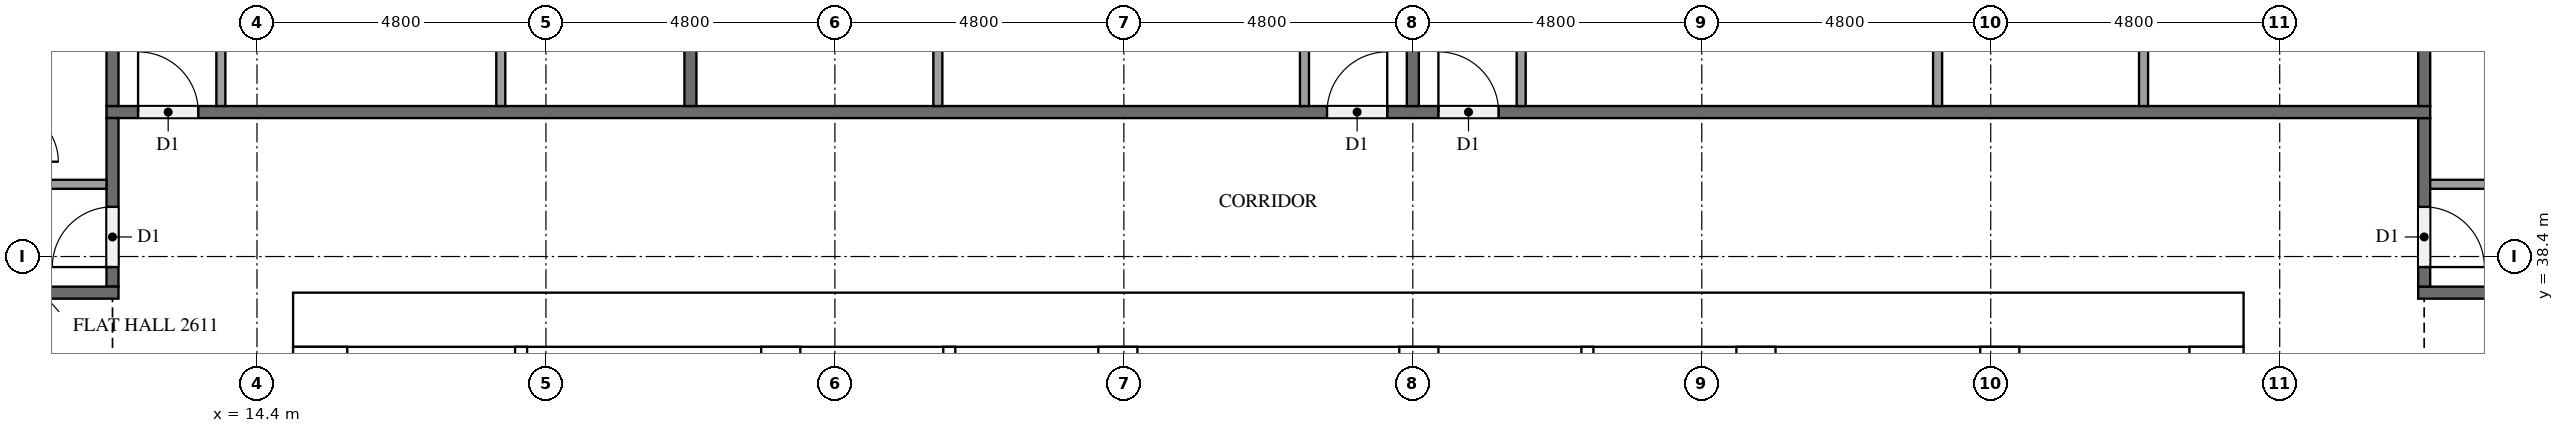
"""IFC4 building model, lengths in metres.
Left out: names, types, materials, properties, quantities, classifications, styles, units other than length and angle.
Written with IfcOpenShell. Run it as: python <this file> out.ifc"""

import sys

from ifc_helpers import new_model, si_unit, direction, frame, frame_2d, origin, place, context, subcontext, project, spatial, rectangle, extrude, element, fill, save


model = new_model("IFC4")
c1 = context("Model", 3, precision=1e-05, world=origin(), true_north=direction((0.0, 1.0)))
c2 = subcontext(c1, "Body", "Model", "MODEL_VIEW")
j1 = project(units=[si_unit("LENGTHUNIT", "METRE"), si_unit("PLANEANGLEUNIT", "RADIAN")], contexts=[c1])
p1 = place(None, origin())
s1 = spatial("IfcSite", under=j1, at=p1, CompositionType="ELEMENT")
p2 = place(p1, origin())
s2 = spatial("IfcBuilding", under=s1, at=p2, CompositionType="ELEMENT")
p3 = place(p2, frame((0.0, 0.0, 103.2)))
s3 = spatial("IfcBuildingStorey", under=s2, at=p3, CompositionType="ELEMENT", Elevation=103.2)
p4 = place(p3, frame((15.0, 37.35, 0.0), z_axis=(0.0, 0.0, 1.0), x_axis=(1.0, 0.0, 0.0)))
e1 = element("IfcWall", 1, at=p4, inside=s3, PredefinedType="SHEAR", context=c2, shape_type="SweptSolid", body=[
    extrude(rectangle(XDim=32.4, YDim=0.9, at=frame_2d((16.2, 0.0))), origin(), (0.0, 0.0, 1.0), 3.2),
])
p5 = place(p4, frame((15.3, 0.0, 0.0)))
e2 = element("IfcOpeningElement", 2, at=p5, cuts=e1, PredefinedType="OPENING", context=c2, shape_type="SweptSolid", body=[
    extrude(rectangle(XDim=1.8, YDim=2.1, at=frame_2d((0.9, 1.05))), frame((0.0, 0.46, 0.0), z_axis=(0.0, -1.0, 0.0), x_axis=(1.0, 0.0, 0.0)), (0.0, 0.0, 1.0), 0.92),
])
p6 = place(p4, frame((1.794, 0.0, 0.0)))
e3 = element("IfcOpeningElement", 3, at=p6, cuts=e1, PredefinedType="OPENING", context=c2, shape_type="SweptSolid", body=[
    extrude(rectangle(XDim=1.0, YDim=2.1, at=frame_2d((0.5, 1.05))), frame((0.0, 0.46, 0.0), z_axis=(0.0, -1.0, 0.0), x_axis=(1.0, 0.0, 0.0)), (0.0, 0.0, 1.0), 0.92),
])
p7 = place(p4, frame((5.331, 0.0, 0.0)))
e4 = element("IfcOpeningElement", 4, at=p7, cuts=e1, PredefinedType="OPENING", context=c2, shape_type="SweptSolid", body=[
    extrude(rectangle(XDim=1.0, YDim=2.1, at=frame_2d((0.5, 1.05))), frame((0.0, 0.46, 0.0), z_axis=(0.0, -1.0, 0.0), x_axis=(1.0, 0.0, 0.0)), (0.0, 0.0, 1.0), 0.92),
])
p8 = place(p3, frame((15.45, 15.9, 0.0), z_axis=(0.0, 0.0, 1.0), x_axis=(0.0, 1.0, 0.0)))
e5 = element("IfcWall", 5, at=p8, inside=s3, PredefinedType="SHEAR", context=c2, shape_type="SweptSolid", body=[
    extrude(rectangle(XDim=21.0, YDim=0.9, at=frame_2d((10.5, 0.0))), origin(), (0.0, 0.0, 1.0), 3.2),
])
p9 = place(p8, frame((4.86, 0.0, 0.0)))
e6 = element("IfcOpeningElement", 6, at=p9, cuts=e5, PredefinedType="OPENING", context=c2, shape_type="SweptSolid", body=[
    extrude(rectangle(XDim=1.2, YDim=2.1, at=frame_2d((0.6, 1.05))), frame((0.0, 0.46, 0.0), z_axis=(0.0, -1.0, 0.0), x_axis=(1.0, 0.0, 0.0)), (0.0, 0.0, 1.0), 0.92),
])
p10 = place(p3, frame((46.95, 15.9, 0.0), z_axis=(0.0, 0.0, 1.0), x_axis=(0.0, 1.0, 0.0)))
e7 = element("IfcWall", 7, at=p10, inside=s3, PredefinedType="SHEAR", context=c2, shape_type="SweptSolid", body=[
    extrude(rectangle(XDim=21.0, YDim=0.9, at=frame_2d((10.5, 0.0))), origin(), (0.0, 0.0, 1.0), 3.2),
])
p11 = place(p10, frame((10.2, 0.0, 0.0)))
e8 = element("IfcOpeningElement", 8, at=p11, cuts=e7, PredefinedType="OPENING", context=c2, shape_type="SweptSolid", body=[
    extrude(rectangle(XDim=1.2, YDim=2.1, at=frame_2d((0.6, 1.05))), frame((0.0, 0.46, 0.0), z_axis=(0.0, -1.0, 0.0), x_axis=(1.0, 0.0, 0.0)), (0.0, 0.0, 1.0), 0.92),
])
p12 = place(p3, frame((23.1, 15.9, 0.0), z_axis=(0.0, 0.0, 1.0), x_axis=(0.0, 1.0, 0.0)))
e9 = element("IfcWall", 9, at=p12, inside=s3, PredefinedType="SHEAR", context=c2, shape_type="SweptSolid", body=[
    extrude(rectangle(XDim=21.0, YDim=0.65, at=frame_2d((10.5, 0.0))), origin(), (0.0, 0.0, 1.0), 3.2),
])
p13 = place(p3, frame((39.3, 27.75, 0.0), z_axis=(0.0, 0.0, 1.0), x_axis=(0.0, 1.0, 0.0)))
e10 = element("IfcWall", 10, at=p13, inside=s3, PredefinedType="SHEAR", context=c2, shape_type="SweptSolid", body=[
    extrude(rectangle(XDim=9.15, YDim=0.65, at=frame_2d((4.575, 0.0))), origin(), (0.0, 0.0, 1.0), 3.2),
])
p14 = place(p3, frame((43.35, 27.75, 0.0), z_axis=(0.0, 0.0, 1.0), x_axis=(0.0, 1.0, 0.0)))
e11 = element("IfcWall", 11, at=p14, inside=s3, PredefinedType="SHEAR", context=c2, shape_type="SweptSolid", body=[
    extrude(rectangle(XDim=9.15, YDim=0.65, at=frame_2d((4.575, 0.0))), origin(), (0.0, 0.0, 1.0), 3.2),
])
p15 = place(p14, frame((7.65, 0.0, 0.0)))
e12 = element("IfcOpeningElement", 12, at=p15, cuts=e11, PredefinedType="OPENING", context=c2, shape_type="SweptSolid", body=[
    extrude(rectangle(XDim=1.2, YDim=2.1, at=frame_2d((0.6, 1.05))), frame((0.0, 0.335, 0.0), z_axis=(0.0, -1.0, 0.0), x_axis=(1.0, 0.0, 0.0)), (0.0, 0.0, 1.0), 0.67),
])
for number, where, z_axis, x_axis in (
    (13, (28.7, 33.875, 0.0), (0.0, 0.0, 1.0), (0.0, 1.0, 0.0)),
    (14, (33.7, 33.875, 0.0), (0.0, 0.0, 1.0), (0.0, 1.0, 0.0)),
):
    element("IfcWall", number, at=place(p3, frame(where, z_axis=z_axis, x_axis=x_axis)), inside=s3, PredefinedType="SHEAR", context=c2, shape_type="SweptSolid", body=[
        extrude(rectangle(XDim=3.025, YDim=0.65, at=frame_2d((1.512, 0.0))), origin(), (0.0, 0.0, 1.0), 3.2),
    ])
for number, where, z_axis, x_axis in (
    (15, (25.9, 33.875, 0.0), (0.0, 0.0, 1.0), (0.0, 1.0, 0.0)),
    (16, (36.5, 33.875, 0.0), (0.0, 0.0, 1.0), (0.0, 1.0, 0.0)),
):
    element("IfcWall", number, at=place(p3, frame(where, z_axis=z_axis, x_axis=x_axis)), inside=s3, PredefinedType="SOLIDWALL", context=c2, shape_type="SweptSolid", body=[
        extrude(rectangle(XDim=3.025, YDim=0.2, at=frame_2d((1.512, 0.0))), origin(), (0.0, 0.0, 1.0), 3.2),
    ])
p16 = place(p3, frame((18.788, 31.575, 0.0), z_axis=(0.0, 0.0, 1.0), x_axis=(0.0, 1.0, 0.0)))
e17 = element("IfcWall", 17, at=p16, inside=s3, PredefinedType="PARTITIONING", context=c2, shape_type="SweptSolid", body=[
    extrude(rectangle(XDim=5.325, YDim=0.2, at=frame_2d((2.663, 0.0))), origin(), (0.0, 0.0, 1.0), 3.2),
])
p17 = place(p3, frame((52.5, 37.8, 0.0), z_axis=(0.0, 0.0, 1.0), x_axis=(-1.0, 0.0, 0.0)))
e18 = element("IfcWall", 18, at=p17, inside=s3, PredefinedType="PARTITIONING", context=c2, shape_type="SweptSolid", body=[
    extrude(rectangle(XDim=2.2, YDim=0.2, at=frame_2d((1.1, 0.0))), origin(), (0.0, 0.0, 1.0), 3.2),
])
p18 = place(p3, frame((50.4, 40.7, 0.0), z_axis=(0.0, 0.0, 1.0), x_axis=(0.0, -1.0, 0.0)))
e19 = element("IfcWall", 19, at=p18, inside=s3, PredefinedType="PARTITIONING", context=c2, shape_type="SweptSolid", body=[
    extrude(rectangle(XDim=2.8, YDim=0.2, at=frame_2d((1.4, 0.0))), origin(), (0.0, 0.0, 1.0), 3.2),
])
p19 = place(p18, frame((1.475, 0.0, 0.0)))
e20 = element("IfcOpeningElement", 20, at=p19, cuts=e19, PredefinedType="OPENING", context=c2, shape_type="SweptSolid", body=[
    extrude(rectangle(XDim=1.0, YDim=2.1, at=frame_2d((0.5, 1.05))), frame((0.0, 0.11, 0.0), z_axis=(0.0, -1.0, 0.0), x_axis=(1.0, 0.0, 0.0)), (0.0, 0.0, 1.0), 0.22),
])
p20 = place(p3, frame((11.9, 40.8, 0.0), z_axis=(0.0, 0.0, 1.0), x_axis=(1.0, 0.0, 0.0)))
e21 = element("IfcWall", 21, at=p20, inside=s3, PredefinedType="PARTITIONING", context=c2, shape_type="SweptSolid", body=[
    extrude(rectangle(XDim=38.6, YDim=0.2, at=frame_2d((19.3, 0.0))), origin(), (0.0, 0.0, 1.0), 3.2),
])
p21 = place(p20, frame((22.125, 0.0, 0.0)))
e22 = element("IfcOpeningElement", 22, at=p21, cuts=e21, PredefinedType="OPENING", context=c2, shape_type="SweptSolid", body=[
    extrude(rectangle(XDim=1.0, YDim=2.1, at=frame_2d((0.5, 1.05))), frame((0.0, 0.11, 0.0), z_axis=(0.0, -1.0, 0.0), x_axis=(1.0, 0.0, 0.0)), (0.0, 0.0, 1.0), 0.22),
])
p22 = place(p20, frame((20.275, 0.0, 0.0)))
e23 = element("IfcOpeningElement", 23, at=p22, cuts=e21, PredefinedType="OPENING", context=c2, shape_type="SweptSolid", body=[
    extrude(rectangle(XDim=1.0, YDim=2.1, at=frame_2d((0.5, 1.05))), frame((0.0, 0.11, 0.0), z_axis=(0.0, -1.0, 0.0), x_axis=(1.0, 0.0, 0.0)), (0.0, 0.0, 1.0), 0.22),
])
p23 = place(p20, frame((0.525, 0.0, 0.0)))
e24 = element("IfcOpeningElement", 24, at=p23, cuts=e21, PredefinedType="OPENING", context=c2, shape_type="SweptSolid", body=[
    extrude(rectangle(XDim=1.0, YDim=2.1, at=frame_2d((0.5, 1.05))), frame((0.0, 0.11, 0.0), z_axis=(0.0, -1.0, 0.0), x_axis=(1.0, 0.0, 0.0)), (0.0, 0.0, 1.0), 0.22),
])
p24 = place(p3, frame((12.0, 37.9, 0.0), z_axis=(0.0, 0.0, 1.0), x_axis=(0.0, 1.0, 0.0)))
e25 = element("IfcWall", 25, at=p24, inside=s3, PredefinedType="PARTITIONING", context=c2, shape_type="SweptSolid", body=[
    extrude(rectangle(XDim=2.8, YDim=0.2, at=frame_2d((1.4, 0.0))), origin(), (0.0, 0.0, 1.0), 3.2),
])
p25 = place(p24, frame((0.325, 0.0, 0.0)))
e26 = element("IfcOpeningElement", 26, at=p25, cuts=e25, PredefinedType="OPENING", context=c2, shape_type="SweptSolid", body=[
    extrude(rectangle(XDim=1.0, YDim=2.1, at=frame_2d((0.5, 1.05))), frame((0.0, 0.11, 0.0), z_axis=(0.0, -1.0, 0.0), x_axis=(1.0, 0.0, 0.0)), (0.0, 0.0, 1.0), 0.22),
])
p26 = place(p3, frame((12.1, 37.8, 0.0), z_axis=(0.0, 0.0, 1.0), x_axis=(-1.0, 0.0, 0.0)))
e27 = element("IfcWall", 27, at=p26, inside=s3, PredefinedType="PARTITIONING", context=c2, shape_type="SweptSolid", body=[
    extrude(rectangle(XDim=2.2, YDim=0.2, at=frame_2d((1.1, 0.0))), origin(), (0.0, 0.0, 1.0), 3.2),
])
for number, where, z_axis, x_axis in (
    (28, (50.4, 40.9, 0.0), (0.0, 0.0, 1.0), (0.0, 1.0, 0.0)),
    (29, (33.6, 52.7, 0.0), (0.0, 0.0, 1.0), (0.0, -1.0, 0.0)),
    (30, (21.6, 52.7, 0.0), (0.0, 0.0, 1.0), (0.0, -1.0, 0.0)),
    (31, (12.0, 52.7, 0.0), (0.0, 0.0, 1.0), (0.0, -1.0, 0.0)),
):
    element("IfcWall", number, at=place(p3, frame(where, z_axis=z_axis, x_axis=x_axis)), inside=s3, PredefinedType="PARTITIONING", context=c2, shape_type="SweptSolid", body=[
        extrude(rectangle(XDim=11.8, YDim=0.2, at=frame_2d((5.9, 0.0))), origin(), (0.0, 0.0, 1.0), 3.2),
    ])
p27 = place(p3, frame((50.5, 39.6, 0.0), z_axis=(0.0, 0.0, 1.0), x_axis=(1.0, 0.0, 0.0)))
e32 = element("IfcWall", 32, at=p27, inside=s3, PredefinedType="PARTITIONING", context=c2, shape_type="SweptSolid", body=[
    extrude(rectangle(XDim=4.625, YDim=0.15, at=frame_2d((2.312, 0.0))), origin(), (0.0, 0.0, 1.0), 3.2),
])
for number, where, z_axis, x_axis in (
    (33, (42.317, 40.9, 0.0), (0.0, 0.0, 1.0), (0.0, 1.0, 0.0)),
    (34, (45.739, 40.9, 0.0), (0.0, 0.0, 1.0), (0.0, 1.0, 0.0)),
):
    element("IfcWall", number, at=place(p3, frame(where, z_axis=z_axis, x_axis=x_axis)), inside=s3, PredefinedType="PARTITIONING", context=c2, shape_type="SweptSolid", body=[
        extrude(rectangle(XDim=3.875, YDim=0.15, at=frame_2d((1.938, 0.0))), origin(), (0.0, 0.0, 1.0), 3.2),
    ])
p28 = place(p3, frame((35.4, 40.9, 0.0), z_axis=(0.0, 0.0, 1.0), x_axis=(0.0, 1.0, 0.0)))
e35 = element("IfcWall", 35, at=p28, inside=s3, PredefinedType="PARTITIONING", context=c2, shape_type="SweptSolid", body=[
    extrude(rectangle(XDim=4.025, YDim=0.15, at=frame_2d((2.013, 0.0))), origin(), (0.0, 0.0, 1.0), 3.2),
])
p29 = place(p3, frame((25.71, 40.9, 0.0), z_axis=(0.0, 0.0, 1.0), x_axis=(0.0, 1.0, 0.0)))
e36 = element("IfcWall", 36, at=p29, inside=s3, PredefinedType="PARTITIONING", context=c2, shape_type="SweptSolid", body=[
    extrude(rectangle(XDim=3.125, YDim=0.15, at=frame_2d((1.562, 0.0))), origin(), (0.0, 0.0, 1.0), 3.2),
])
p30 = place(p3, frame((31.8, 40.9, 0.0), z_axis=(0.0, 0.0, 1.0), x_axis=(0.0, 1.0, 0.0)))
e37 = element("IfcWall", 37, at=p30, inside=s3, PredefinedType="PARTITIONING", context=c2, shape_type="SweptSolid", body=[
    extrude(rectangle(XDim=3.275, YDim=0.15, at=frame_2d((1.638, 0.0))), origin(), (0.0, 0.0, 1.0), 3.2),
])
p31 = place(p3, frame((18.45, 40.9, 0.0), z_axis=(0.0, 0.0, 1.0), x_axis=(0.0, 1.0, 0.0)))
e38 = element("IfcWall", 38, at=p31, inside=s3, PredefinedType="PARTITIONING", context=c2, shape_type="SweptSolid", body=[
    extrude(rectangle(XDim=3.875, YDim=0.15, at=frame_2d((1.938, 0.0))), origin(), (0.0, 0.0, 1.0), 3.2),
])
p32 = place(p3, frame((13.8, 40.9, 0.0), z_axis=(0.0, 0.0, 1.0), x_axis=(0.0, 1.0, 0.0)))
e39 = element("IfcWall", 39, at=p32, inside=s3, PredefinedType="PARTITIONING", context=c2, shape_type="SweptSolid", body=[
    extrude(rectangle(XDim=4.025, YDim=0.15, at=frame_2d((2.013, 0.0))), origin(), (0.0, 0.0, 1.0), 3.2),
])
p33 = place(p3, frame((11.9, 39.6, 0.0), z_axis=(0.0, 0.0, 1.0), x_axis=(-1.0, 0.0, 0.0)))
e40 = element("IfcWall", 40, at=p33, inside=s3, PredefinedType="PARTITIONING", context=c2, shape_type="SweptSolid", body=[
    extrude(rectangle(XDim=1.775, YDim=0.15, at=frame_2d((0.887, 0.0))), origin(), (0.0, 0.0, 1.0), 3.2),
])
p34 = place(p5, origin())
e41 = element("IfcDoor", 41, at=p34, inside=s3, OperationType="DOUBLE_DOOR_SINGLE_SWING", PredefinedType="DOOR", context=c2, shape_type="SweptSolid", body=[
    extrude(rectangle(XDim=1.8, YDim=2.1, at=frame_2d((0.9, 1.05))), frame((0.0, 0.025, 0.0), z_axis=(0.0, -1.0, 0.0), x_axis=(1.0, 0.0, 0.0)), (0.0, 0.0, 1.0), 0.05),
])
fill(e2, e41)
p35 = place(p6, origin())
e42 = element("IfcDoor", 42, at=p35, inside=s3, OperationType="SINGLE_SWING_LEFT", PredefinedType="DOOR", context=c2, shape_type="SweptSolid", body=[
    extrude(rectangle(XDim=1.0, YDim=2.1, at=frame_2d((0.5, 1.05))), frame((0.0, 0.025, 0.0), z_axis=(0.0, -1.0, 0.0), x_axis=(1.0, 0.0, 0.0)), (0.0, 0.0, 1.0), 0.05),
])
fill(e3, e42)
p36 = place(p7, origin())
e43 = element("IfcDoor", 43, at=p36, inside=s3, OperationType="SINGLE_SWING_RIGHT", PredefinedType="DOOR", context=c2, shape_type="SweptSolid", body=[
    extrude(rectangle(XDim=1.0, YDim=2.1, at=frame_2d((0.5, 1.05))), frame((0.0, 0.025, 0.0), z_axis=(0.0, -1.0, 0.0), x_axis=(1.0, 0.0, 0.0)), (0.0, 0.0, 1.0), 0.05),
])
fill(e4, e43)
p37 = place(p19, origin())
e44 = element("IfcDoor", 44, at=p37, inside=s3, OperationType="SINGLE_SWING_RIGHT", PredefinedType="DOOR", context=c2, shape_type="SweptSolid", body=[
    extrude(rectangle(XDim=1.0, YDim=2.1, at=frame_2d((0.5, 1.05))), frame((0.0, 0.025, 0.0), z_axis=(0.0, -1.0, 0.0), x_axis=(1.0, 0.0, 0.0)), (0.0, 0.0, 1.0), 0.05),
])
fill(e20, e44)
p38 = place(p21, origin())
e45 = element("IfcDoor", 45, at=p38, inside=s3, OperationType="SINGLE_SWING_LEFT", PredefinedType="DOOR", context=c2, shape_type="SweptSolid", body=[
    extrude(rectangle(XDim=1.0, YDim=2.1, at=frame_2d((0.5, 1.05))), frame((0.0, 0.025, 0.0), z_axis=(0.0, -1.0, 0.0), x_axis=(1.0, 0.0, 0.0)), (0.0, 0.0, 1.0), 0.05),
])
fill(e22, e45)
p39 = place(p22, origin())
e46 = element("IfcDoor", 46, at=p39, inside=s3, OperationType="SINGLE_SWING_RIGHT", PredefinedType="DOOR", context=c2, shape_type="SweptSolid", body=[
    extrude(rectangle(XDim=1.0, YDim=2.1, at=frame_2d((0.5, 1.05))), frame((0.0, 0.025, 0.0), z_axis=(0.0, -1.0, 0.0), x_axis=(1.0, 0.0, 0.0)), (0.0, 0.0, 1.0), 0.05),
])
fill(e23, e46)
p40 = place(p23, origin())
e47 = element("IfcDoor", 47, at=p40, inside=s3, OperationType="SINGLE_SWING_LEFT", PredefinedType="DOOR", context=c2, shape_type="SweptSolid", body=[
    extrude(rectangle(XDim=1.0, YDim=2.1, at=frame_2d((0.5, 1.05))), frame((0.0, 0.025, 0.0), z_axis=(0.0, -1.0, 0.0), x_axis=(1.0, 0.0, 0.0)), (0.0, 0.0, 1.0), 0.05),
])
fill(e24, e47)
p41 = place(p25, origin())
e48 = element("IfcDoor", 48, at=p41, inside=s3, OperationType="SINGLE_SWING_LEFT", PredefinedType="DOOR", context=c2, shape_type="SweptSolid", body=[
    extrude(rectangle(XDim=1.0, YDim=2.1, at=frame_2d((0.5, 1.05))), frame((0.0, 0.025, 0.0), z_axis=(0.0, -1.0, 0.0), x_axis=(1.0, 0.0, 0.0)), (0.0, 0.0, 1.0), 0.05),
])
fill(e26, e48)
save(model, sys.argv[1])
